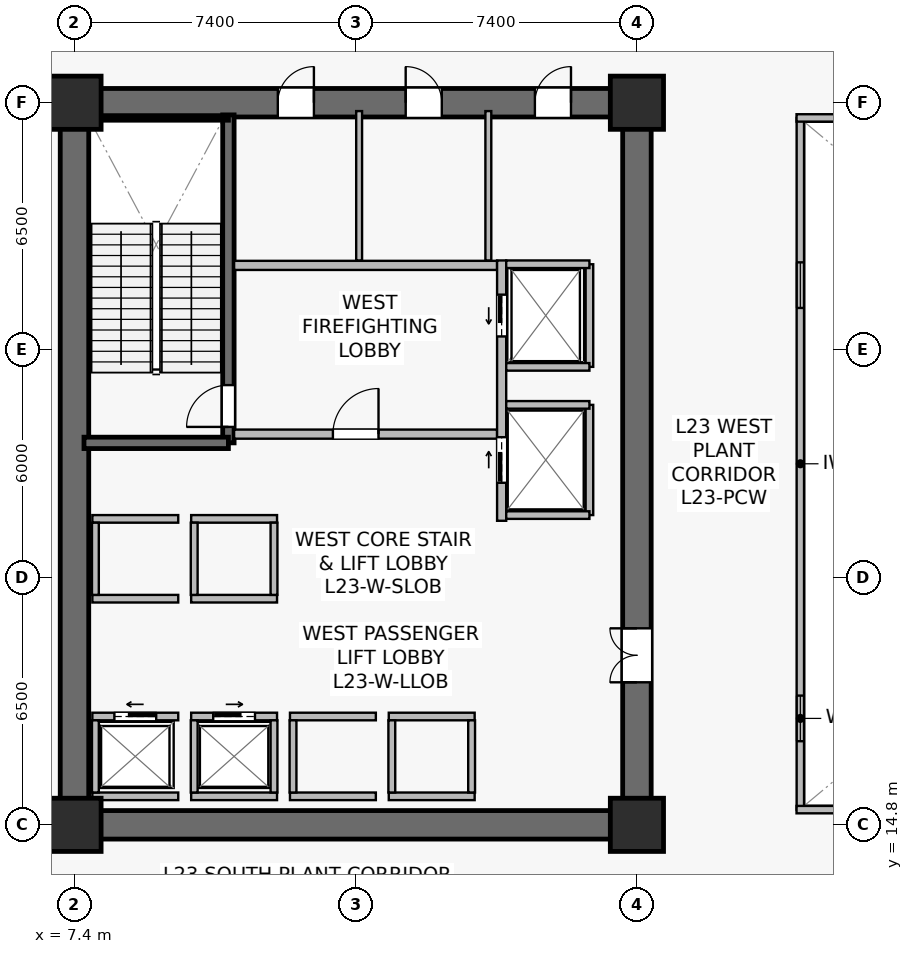
"""IFC4 building model, lengths in metres.
Left out: names, types, materials, properties, quantities, classifications, styles, units other than length and angle.
Written with IfcOpenShell. Run it as: python <this file> out.ifc"""

import sys

from ifc_helpers import new_model, si_unit, direction, frame, frame_2d, origin, origin_2d, place, context, subcontext, project, spatial, rectangle, extrude, source, transform, mapped, element, fill, save


model = new_model("IFC4")
c1 = context("Model", 3, precision=1e-05, world=origin(), true_north=direction((0.0, 1.0)))
c2 = subcontext(c1, "Body", "Model", "MODEL_VIEW")
j1 = project(units=[si_unit("LENGTHUNIT", "METRE"), si_unit("PLANEANGLEUNIT", "RADIAN")], contexts=[c1])
p1 = place(None, origin())
s1 = spatial("IfcSite", under=j1, at=p1, CompositionType="ELEMENT")
p2 = place(p1, origin())
s2 = spatial("IfcBuilding", under=s1, at=p2, CompositionType="ELEMENT")
p3 = place(p2, frame((0.0, 0.0, 94.9)))
s3 = spatial("IfcBuildingStorey", under=s2, at=p3, CompositionType="ELEMENT", Elevation=94.9)
p4 = place(p3, frame((7.025, 14.8, 0.0), z_axis=(0.0, 0.0, 1.0), x_axis=(1.0, 0.0, 0.0)))
e1 = element("IfcWall", 1, at=p4, inside=s3, PredefinedType="SHEAR", context=c2, shape_type="SweptSolid", body=[
    extrude(rectangle(XDim=15.55, YDim=0.75, at=frame_2d((7.775, 0.0))), origin(), (0.0, 0.0, 1.0), 5.09),
])
p5 = place(p3, frame((7.025, 33.8, 0.0), z_axis=(0.0, 0.0, 1.0), x_axis=(1.0, 0.0, 0.0)))
e2 = element("IfcWall", 2, at=p5, inside=s3, PredefinedType="SHEAR", context=c2, shape_type="SweptSolid", body=[
    extrude(rectangle(XDim=15.55, YDim=0.75, at=frame_2d((7.775, 0.0))), origin(), (0.0, 0.0, 1.0), 5.09),
])
p6 = place(p5, frame((5.725, 0.0, 0.0)))
e3 = element("IfcOpeningElement", 3, at=p6, cuts=e2, PredefinedType="OPENING", context=c2, shape_type="SweptSolid", body=[
    extrude(rectangle(XDim=0.95, YDim=2.15, at=frame_2d((0.475, 1.075))), frame((0.0, 0.385, 0.0), z_axis=(0.0, -1.0, 0.0), x_axis=(1.0, 0.0, 0.0)), (0.0, 0.0, 1.0), 0.77),
])
p7 = place(p5, frame((9.09, 0.0, 0.0)))
e4 = element("IfcOpeningElement", 4, at=p7, cuts=e2, PredefinedType="OPENING", context=c2, shape_type="SweptSolid", body=[
    extrude(rectangle(XDim=0.95, YDim=2.15, at=frame_2d((0.475, 1.075))), frame((0.0, 0.385, 0.0), z_axis=(0.0, -1.0, 0.0), x_axis=(1.0, 0.0, 0.0)), (0.0, 0.0, 1.0), 0.77),
])
p8 = place(p5, frame((12.49, 0.0, 0.0)))
e5 = element("IfcOpeningElement", 5, at=p8, cuts=e2, PredefinedType="OPENING", context=c2, shape_type="SweptSolid", body=[
    extrude(rectangle(XDim=0.95, YDim=2.15, at=frame_2d((0.475, 1.075))), frame((0.0, 0.385, 0.0), z_axis=(0.0, -1.0, 0.0), x_axis=(1.0, 0.0, 0.0)), (0.0, 0.0, 1.0), 0.77),
])
p9 = place(p3, frame((7.4, 15.175, 0.0), z_axis=(0.0, 0.0, 1.0), x_axis=(0.0, 1.0, 0.0)))
e6 = element("IfcWall", 6, at=p9, inside=s3, PredefinedType="SHEAR", context=c2, shape_type="SweptSolid", body=[
    extrude(rectangle(XDim=18.25, YDim=0.75, at=frame_2d((9.125, 0.0))), origin(), (0.0, 0.0, 1.0), 5.09),
])
p10 = place(p3, frame((22.2, 15.175, 0.0), z_axis=(0.0, 0.0, 1.0), x_axis=(0.0, 1.0, 0.0)))
e7 = element("IfcWall", 7, at=p10, inside=s3, PredefinedType="SHEAR", context=c2, shape_type="SweptSolid", body=[
    extrude(rectangle(XDim=18.25, YDim=0.75, at=frame_2d((9.125, 0.0))), origin(), (0.0, 0.0, 1.0), 5.09),
])
p11 = place(p10, frame((3.375, 0.0, 0.0)))
e8 = element("IfcOpeningElement", 8, at=p11, cuts=e7, PredefinedType="OPENING", context=c2, shape_type="SweptSolid", body=[
    extrude(rectangle(XDim=1.42, YDim=2.2, at=frame_2d((0.71, 1.1))), frame((0.0, 0.385, 0.0), z_axis=(0.0, -1.0, 0.0), x_axis=(1.0, 0.0, 0.0)), (0.0, 0.0, 1.0), 0.77),
])
p12 = place(p3, frame((11.45, 24.85, 0.0), z_axis=(0.0, 0.0, 1.0), x_axis=(0.0, 1.0, 0.0)))
e9 = element("IfcWall", 9, at=p12, inside=s3, PredefinedType="SHEAR", context=c2, shape_type="SweptSolid", body=[
    extrude(rectangle(XDim=8.63, YDim=0.3, at=frame_2d((4.315, 0.0))), origin(), (0.0, 0.0, 1.0), 5.09),
])
p13 = place(p12, frame((0.42, 0.0, 0.0)))
e10 = element("IfcOpeningElement", 10, at=p13, cuts=e9, PredefinedType="OPENING", context=c2, shape_type="SweptSolid", body=[
    extrude(rectangle(XDim=1.1, YDim=2.15, at=frame_2d((0.55, 1.075))), frame((0.0, 0.16, 0.0), z_axis=(0.0, -1.0, 0.0), x_axis=(1.0, 0.0, 0.0)), (0.0, 0.0, 1.0), 0.32),
])
p14 = place(p3, frame((7.65, 24.85, 0.0), z_axis=(0.0, 0.0, 1.0), x_axis=(1.0, 0.0, 0.0)))
e11 = element("IfcWall", 11, at=p14, inside=s3, PredefinedType="SHEAR", context=c2, shape_type="SweptSolid", body=[
    extrude(rectangle(XDim=3.8, YDim=0.3, at=frame_2d((1.9, 0.0))), origin(), (0.0, 0.0, 1.0), 5.09),
])
p15 = place(p3, frame((7.73, 33.4, 0.0), z_axis=(0.0, 0.0, 1.0), x_axis=(1.0, 0.0, 0.0)))
e12 = element("IfcWall", 12, at=p15, inside=s3, PredefinedType="SOLIDWALL", context=c2, shape_type="SweptSolid", body=[
    extrude(rectangle(XDim=3.72, YDim=0.12, at=frame_2d((1.86, 0.0))), origin(), (0.0, 0.0, 1.0), 5.09),
])
m1 = source(origin(), c2, "Body", "SweptSolid", [
    extrude(rectangle(XDim=1.4, YDim=1.4, at=origin_2d()), origin(), (0.0, 0.0, 1.0), 5.4),
])
for number, where, z_axis, x_axis in (
    (13, (7.4, 14.8, 0.0), (0.0, 0.0, 1.0), (1.0, 0.0, 0.0)),
    (14, (22.2, 14.8, 0.0), (0.0, 0.0, 1.0), (1.0, 0.0, 0.0)),
    (15, (7.4, 33.8, 0.0), (0.0, 0.0, 1.0), (1.0, 0.0, 0.0)),
    (16, (22.2, 33.8, 0.0), (0.0, 0.0, 1.0), (1.0, 0.0, 0.0)),
):
    element("IfcColumn", number, at=place(p3, frame(where, z_axis=z_axis, x_axis=x_axis)), inside=s3, PredefinedType="COLUMN", context=c2, shape_type="MappedRepresentation", body=[
        mapped(m1, transform((0.0, 0.0, 0.0), scale=1.0)),
    ])
p16 = place(p3, frame((11.6, 25.08, 0.0), z_axis=(0.0, 0.0, 1.0), x_axis=(1.0, 0.0, 0.0)))
e17 = element("IfcWall", 17, at=p16, inside=s3, PredefinedType="SOLIDWALL", context=c2, shape_type="SweptSolid", body=[
    extrude(rectangle(XDim=6.92, YDim=0.24, at=frame_2d((3.46, 0.0))), origin(), (0.0, 0.0, 1.0), 4.425),
])
p17 = place(p16, frame((2.6, 0.0, 0.0)))
e18 = element("IfcOpeningElement", 18, at=p17, cuts=e17, PredefinedType="OPENING", context=c2, shape_type="SweptSolid", body=[
    extrude(rectangle(XDim=1.2, YDim=2.16, at=frame_2d((0.6, 1.08))), frame((0.0, 0.13, 0.0), z_axis=(0.0, -1.0, 0.0), x_axis=(1.0, 0.0, 0.0)), (0.0, 0.0, 1.0), 0.26),
])
p18 = place(p3, frame((11.6, 29.52, 0.0), z_axis=(0.0, 0.0, 1.0), x_axis=(1.0, 0.0, 0.0)))
e19 = element("IfcWall", 19, at=p18, inside=s3, PredefinedType="SOLIDWALL", context=c2, shape_type="SweptSolid", body=[
    extrude(rectangle(XDim=6.92, YDim=0.24, at=frame_2d((3.46, 0.0))), origin(), (0.0, 0.0, 1.0), 4.425),
])
p19 = place(p3, frame((18.64, 22.8, 0.0), z_axis=(0.0, 0.0, 1.0), x_axis=(0.0, 1.0, 0.0)))
e20 = element("IfcWall", 20, at=p19, inside=s3, PredefinedType="SOLIDWALL", context=c2, shape_type="SweptSolid", body=[
    extrude(rectangle(XDim=6.85, YDim=0.24, at=frame_2d((3.425, 0.0))), origin(), (0.0, 0.0, 1.0), 4.175),
])
p20 = place(p19, frame((4.85, 0.0, 0.0)))
e21 = element("IfcOpeningElement", 21, at=p20, cuts=e20, PredefinedType="OPENING", context=c2, shape_type="SweptSolid", body=[
    extrude(rectangle(XDim=1.1, YDim=2.22, at=frame_2d((0.55, 1.11))), frame((0.0, 0.13, 0.0), z_axis=(0.0, -1.0, 0.0), x_axis=(1.0, 0.0, 0.0)), (0.0, 0.0, 1.0), 0.26),
])
p21 = place(p19, frame((1.0, 0.0, 0.0)))
e22 = element("IfcOpeningElement", 22, at=p21, cuts=e20, PredefinedType="OPENING", context=c2, shape_type="SweptSolid", body=[
    extrude(rectangle(XDim=1.2, YDim=2.22, at=frame_2d((0.6, 1.11))), frame((0.0, 0.13, 0.0), z_axis=(0.0, -1.0, 0.0), x_axis=(1.0, 0.0, 0.0)), (0.0, 0.0, 1.0), 0.26),
])
p22 = place(p3, frame((7.87, 17.65, 0.0), z_axis=(0.0, 0.0, 1.0), x_axis=(1.0, 0.0, 0.0)))
e23 = element("IfcWall", 23, at=p22, inside=s3, PredefinedType="SOLIDWALL", context=c2, shape_type="SweptSolid", body=[
    extrude(rectangle(XDim=2.26, YDim=0.2, at=frame_2d((1.13, 0.0))), origin(), (0.0, 0.0, 1.0), 5.09),
])
p23 = place(p22, frame((0.58, 0.0, 0.0)))
e24 = element("IfcOpeningElement", 24, at=p23, cuts=e23, PredefinedType="OPENING", context=c2, shape_type="SweptSolid", body=[
    extrude(rectangle(XDim=1.1, YDim=2.22, at=frame_2d((0.55, 1.11))), frame((0.0, 0.11, 0.0), z_axis=(0.0, -1.0, 0.0), x_axis=(1.0, 0.0, 0.0)), (0.0, 0.0, 1.0), 0.22),
])
p24 = place(p3, frame((7.87, 15.55, 0.0), z_axis=(0.0, 0.0, 1.0), x_axis=(1.0, 0.0, 0.0)))
e25 = element("IfcWall", 25, at=p24, inside=s3, PredefinedType="SOLIDWALL", context=c2, shape_type="SweptSolid", body=[
    extrude(rectangle(XDim=2.26, YDim=0.2, at=frame_2d((1.13, 0.0))), origin(), (0.0, 0.0, 1.0), 5.09),
])
p25 = place(p3, frame((7.95, 15.65, 0.0), z_axis=(0.0, 0.0, 1.0), x_axis=(0.0, 1.0, 0.0)))
e26 = element("IfcWall", 26, at=p25, inside=s3, PredefinedType="SOLIDWALL", context=c2, shape_type="SweptSolid", body=[
    extrude(rectangle(XDim=1.9, YDim=0.18, at=frame_2d((0.95, 0.0))), origin(), (0.0, 0.0, 1.0), 5.09),
])
p26 = place(p3, frame((10.47, 17.65, 0.0), z_axis=(0.0, 0.0, 1.0), x_axis=(1.0, 0.0, 0.0)))
e27 = element("IfcWall", 27, at=p26, inside=s3, PredefinedType="SOLIDWALL", context=c2, shape_type="SweptSolid", body=[
    extrude(rectangle(XDim=2.26, YDim=0.2, at=frame_2d((1.13, 0.0))), origin(), (0.0, 0.0, 1.0), 5.09),
])
p27 = place(p26, frame((0.58, 0.0, 0.0)))
e28 = element("IfcOpeningElement", 28, at=p27, cuts=e27, PredefinedType="OPENING", context=c2, shape_type="SweptSolid", body=[
    extrude(rectangle(XDim=1.1, YDim=2.22, at=frame_2d((0.55, 1.11))), frame((0.0, 0.11, 0.0), z_axis=(0.0, -1.0, 0.0), x_axis=(1.0, 0.0, 0.0)), (0.0, 0.0, 1.0), 0.22),
])
p28 = place(p3, frame((10.47, 15.55, 0.0), z_axis=(0.0, 0.0, 1.0), x_axis=(1.0, 0.0, 0.0)))
e29 = element("IfcWall", 29, at=p28, inside=s3, PredefinedType="SOLIDWALL", context=c2, shape_type="SweptSolid", body=[
    extrude(rectangle(XDim=2.26, YDim=0.2, at=frame_2d((1.13, 0.0))), origin(), (0.0, 0.0, 1.0), 5.09),
])
for number, where, z_axis, x_axis in (
    (30, (10.55, 15.65, 0.0), (0.0, 0.0, 1.0), (0.0, 1.0, 0.0)),
    (31, (12.65, 15.65, 0.0), (0.0, 0.0, 1.0), (0.0, 1.0, 0.0)),
):
    element("IfcWall", number, at=place(p3, frame(where, z_axis=z_axis, x_axis=x_axis)), inside=s3, PredefinedType="SOLIDWALL", context=c2, shape_type="SweptSolid", body=[
        extrude(rectangle(XDim=1.9, YDim=0.18, at=frame_2d((0.95, 0.0))), origin(), (0.0, 0.0, 1.0), 5.09),
    ])
for number, where, z_axis, x_axis in (
    (32, (13.07, 17.65, 0.0), (0.0, 0.0, 1.0), (1.0, 0.0, 0.0)),
    (33, (13.07, 15.55, 0.0), (0.0, 0.0, 1.0), (1.0, 0.0, 0.0)),
):
    element("IfcWall", number, at=place(p3, frame(where, z_axis=z_axis, x_axis=x_axis)), inside=s3, PredefinedType="SOLIDWALL", context=c2, shape_type="SweptSolid", body=[
        extrude(rectangle(XDim=2.26, YDim=0.2, at=frame_2d((1.13, 0.0))), origin(), (0.0, 0.0, 1.0), 4.425),
    ])
p29 = place(p3, frame((13.15, 15.65, 0.0), z_axis=(0.0, 0.0, 1.0), x_axis=(0.0, 1.0, 0.0)))
e34 = element("IfcWall", 34, at=p29, inside=s3, PredefinedType="SOLIDWALL", context=c2, shape_type="SweptSolid", body=[
    extrude(rectangle(XDim=1.9, YDim=0.18, at=frame_2d((0.95, 0.0))), origin(), (0.0, 0.0, 1.0), 5.09),
])
for number, where, z_axis, x_axis in (
    (35, (15.67, 17.65, 0.0), (0.0, 0.0, 1.0), (1.0, 0.0, 0.0)),
    (36, (15.67, 15.55, 0.0), (0.0, 0.0, 1.0), (1.0, 0.0, 0.0)),
):
    element("IfcWall", number, at=place(p3, frame(where, z_axis=z_axis, x_axis=x_axis)), inside=s3, PredefinedType="SOLIDWALL", context=c2, shape_type="SweptSolid", body=[
        extrude(rectangle(XDim=2.26, YDim=0.2, at=frame_2d((1.13, 0.0))), origin(), (0.0, 0.0, 1.0), 5.09),
    ])
for number, where, z_axis, x_axis in (
    (37, (15.75, 15.65, 0.0), (0.0, 0.0, 1.0), (0.0, 1.0, 0.0)),
    (38, (17.85, 15.65, 0.0), (0.0, 0.0, 1.0), (0.0, 1.0, 0.0)),
):
    element("IfcWall", number, at=place(p3, frame(where, z_axis=z_axis, x_axis=x_axis)), inside=s3, PredefinedType="SOLIDWALL", context=c2, shape_type="SweptSolid", body=[
        extrude(rectangle(XDim=1.9, YDim=0.18, at=frame_2d((0.95, 0.0))), origin(), (0.0, 0.0, 1.0), 5.09),
    ])
for number, where, z_axis, x_axis in (
    (39, (7.87, 20.75, 0.0), (0.0, 0.0, 1.0), (1.0, 0.0, 0.0)),
    (40, (7.87, 22.85, 0.0), (0.0, 0.0, 1.0), (1.0, 0.0, 0.0)),
):
    element("IfcWall", number, at=place(p3, frame(where, z_axis=z_axis, x_axis=x_axis)), inside=s3, PredefinedType="SOLIDWALL", context=c2, shape_type="SweptSolid", body=[
        extrude(rectangle(XDim=2.26, YDim=0.2, at=frame_2d((1.13, 0.0))), origin(), (0.0, 0.0, 1.0), 5.09),
    ])
p30 = place(p3, frame((7.95, 20.85, 0.0), z_axis=(0.0, 0.0, 1.0), x_axis=(0.0, 1.0, 0.0)))
e41 = element("IfcWall", 41, at=p30, inside=s3, PredefinedType="SOLIDWALL", context=c2, shape_type="SweptSolid", body=[
    extrude(rectangle(XDim=1.9, YDim=0.18, at=frame_2d((0.95, 0.0))), origin(), (0.0, 0.0, 1.0), 5.09),
])
for number, where, z_axis, x_axis in (
    (42, (10.47, 20.75, 0.0), (0.0, 0.0, 1.0), (1.0, 0.0, 0.0)),
    (43, (10.47, 22.85, 0.0), (0.0, 0.0, 1.0), (1.0, 0.0, 0.0)),
):
    element("IfcWall", number, at=place(p3, frame(where, z_axis=z_axis, x_axis=x_axis)), inside=s3, PredefinedType="SOLIDWALL", context=c2, shape_type="SweptSolid", body=[
        extrude(rectangle(XDim=2.26, YDim=0.2, at=frame_2d((1.13, 0.0))), origin(), (0.0, 0.0, 1.0), 5.09),
    ])
for number, where, z_axis, x_axis in (
    (44, (10.55, 20.85, 0.0), (0.0, 0.0, 1.0), (0.0, 1.0, 0.0)),
    (45, (12.65, 20.85, 0.0), (0.0, 0.0, 1.0), (0.0, 1.0, 0.0)),
):
    element("IfcWall", number, at=place(p3, frame(where, z_axis=z_axis, x_axis=x_axis)), inside=s3, PredefinedType="SOLIDWALL", context=c2, shape_type="SweptSolid", body=[
        extrude(rectangle(XDim=1.9, YDim=0.18, at=frame_2d((0.95, 0.0))), origin(), (0.0, 0.0, 1.0), 5.09),
    ])
p31 = place(p3, frame((20.95, 26.85, 0.0), z_axis=(0.0, 0.0, 1.0), x_axis=(0.0, 1.0, 0.0)))
e46 = element("IfcWall", 46, at=p31, inside=s3, PredefinedType="SOLIDWALL", context=c2, shape_type="SweptSolid", body=[
    extrude(rectangle(XDim=2.7, YDim=0.2, at=frame_2d((1.35, 0.0))), origin(), (0.0, 0.0, 1.0), 5.09),
])
p32 = place(p3, frame((18.76, 29.55, 0.0), z_axis=(0.0, 0.0, 1.0), x_axis=(1.0, 0.0, 0.0)))
e47 = element("IfcWall", 47, at=p32, inside=s3, PredefinedType="SOLIDWALL", context=c2, shape_type="SweptSolid", body=[
    extrude(rectangle(XDim=2.19, YDim=0.2, at=frame_2d((1.095, 0.0))), origin(), (0.0, 0.0, 1.0), 5.09),
])
p33 = place(p3, frame((18.76, 26.85, 0.0), z_axis=(0.0, 0.0, 1.0), x_axis=(1.0, 0.0, 0.0)))
e48 = element("IfcWall", 48, at=p33, inside=s3, PredefinedType="SOLIDWALL", context=c2, shape_type="SweptSolid", body=[
    extrude(rectangle(XDim=2.19, YDim=0.2, at=frame_2d((1.095, 0.0))), origin(), (0.0, 0.0, 1.0), 4.487),
])
p34 = place(p3, frame((20.95, 22.95, 0.0), z_axis=(0.0, 0.0, 1.0), x_axis=(0.0, 1.0, 0.0)))
e49 = element("IfcWall", 49, at=p34, inside=s3, PredefinedType="SOLIDWALL", context=c2, shape_type="SweptSolid", body=[
    extrude(rectangle(XDim=2.9, YDim=0.2, at=frame_2d((1.45, 0.0))), origin(), (0.0, 0.0, 1.0), 4.175),
])
for number, where, z_axis, x_axis in (
    (50, (18.76, 25.85, 0.0), (0.0, 0.0, 1.0), (1.0, 0.0, 0.0)),
    (51, (18.76, 22.95, 0.0), (0.0, 0.0, 1.0), (1.0, 0.0, 0.0)),
):
    element("IfcWall", number, at=place(p3, frame(where, z_axis=z_axis, x_axis=x_axis)), inside=s3, PredefinedType="SOLIDWALL", context=c2, shape_type="SweptSolid", body=[
        extrude(rectangle(XDim=2.19, YDim=0.2, at=frame_2d((1.095, 0.0))), origin(), (0.0, 0.0, 1.0), 5.09),
    ])
p35 = place(p3, frame((14.89, 29.65, 0.0), z_axis=(0.0, 0.0, 1.0), x_axis=(0.0, 1.0, 0.0)))
e52 = element("IfcWall", 52, at=p35, inside=s3, PredefinedType="PLUMBINGWALL", context=c2, shape_type="SweptSolid", body=[
    extrude(rectangle(XDim=3.93, YDim=0.155, at=frame_2d((1.965, 0.0))), origin(), (0.0, 0.0, 1.0), 4.425),
])
p36 = place(p3, frame((18.29, 29.65, 0.0), z_axis=(0.0, 0.0, 1.0), x_axis=(0.0, 1.0, 0.0)))
e53 = element("IfcWall", 53, at=p36, inside=s3, PredefinedType="PLUMBINGWALL", context=c2, shape_type="SweptSolid", body=[
    extrude(rectangle(XDim=3.93, YDim=0.155, at=frame_2d((1.965, 0.0))), origin(), (0.0, 0.0, 1.0), 5.09),
])
p37 = place(p3, frame((26.5, 15.2, 0.0), z_axis=(0.0, 0.0, 1.0), x_axis=(0.0, 1.0, 0.0)))
e54 = element("IfcWall", 54, at=p37, inside=s3, PredefinedType="SOLIDWALL", context=c2, shape_type="SweptSolid", body=[
    extrude(rectangle(XDim=18.2, YDim=0.195, at=frame_2d((9.1, 0.0))), origin(), (0.0, 0.0, 1.0), 5.09),
])
p38 = place(p37, frame((1.8, 0.0, 0.9)))
e55 = element("IfcOpeningElement", 55, at=p38, cuts=e54, PredefinedType="OPENING", context=c2, shape_type="SweptSolid", body=[
    extrude(rectangle(XDim=1.2, YDim=1.35, at=frame_2d((0.6, 0.675))), frame((0.0, 0.107, 0.0), z_axis=(0.0, -1.0, 0.0), x_axis=(1.0, 0.0, 0.0)), (0.0, 0.0, 1.0), 0.215),
])
p39 = place(p37, frame((13.2, 0.0, 0.9)))
e56 = element("IfcOpeningElement", 56, at=p39, cuts=e54, PredefinedType="OPENING", context=c2, shape_type="SweptSolid", body=[
    extrude(rectangle(XDim=1.2, YDim=1.35, at=frame_2d((0.6, 0.675))), frame((0.0, 0.107, 0.0), z_axis=(0.0, -1.0, 0.0), x_axis=(1.0, 0.0, 0.0)), (0.0, 0.0, 1.0), 0.215),
])
for number, where, z_axis, x_axis in (
    (57, (26.4, 15.2, 0.0), (0.0, 0.0, 1.0), (1.0, 0.0, 0.0)),
    (58, (26.4, 33.4, 0.0), (0.0, 0.0, 1.0), (1.0, 0.0, 0.0)),
):
    element("IfcWall", number, at=place(p3, frame(where, z_axis=z_axis, x_axis=x_axis)), inside=s3, PredefinedType="SOLIDWALL", context=c2, shape_type="SweptSolid", body=[
        extrude(rectangle(XDim=22.0, YDim=0.195, at=frame_2d((11.0, 0.0))), origin(), (0.0, 0.0, 1.0), 5.09),
    ])
m2 = source(origin(), c2, "Body", "SweptSolid", [
    extrude(rectangle(XDim=1.2, YDim=1.35, at=frame_2d((0.6, 0.675))), frame((0.0, 0.03, 0.0), z_axis=(0.0, -1.0, 0.0), x_axis=(1.0, 0.0, 0.0)), (0.0, 0.0, 1.0), 0.06),
])
p40 = place(p38, origin())
e59 = element("IfcWindow", 59, at=p40, inside=s3, PartitioningType="SINGLE_PANEL", PredefinedType="WINDOW", context=c2, shape_type="MappedRepresentation", body=[
    mapped(m2, transform((0.0, 0.0, 0.0), scale=1.0)),
])
fill(e55, e59)
p41 = place(p39, origin())
e60 = element("IfcWindow", 60, at=p41, inside=s3, PartitioningType="SINGLE_PANEL", PredefinedType="WINDOW", context=c2, shape_type="MappedRepresentation", body=[
    mapped(m2, transform((0.0, 0.0, 0.0), scale=1.0)),
])
fill(e56, e60)
m3 = source(origin(), c2, "Body", "SweptSolid", [
    extrude(rectangle(XDim=1.1, YDim=2.15, at=frame_2d((0.55, 1.075))), frame((0.0, 0.025, 0.0), z_axis=(0.0, -1.0, 0.0), x_axis=(1.0, 0.0, 0.0)), (0.0, 0.0, 1.0), 0.05),
])
p42 = place(p13, origin())
e61 = element("IfcDoor", 61, at=p42, inside=s3, OperationType="SINGLE_SWING_LEFT", PredefinedType="DOOR", context=c2, shape_type="MappedRepresentation", body=[
    mapped(m3, transform((0.0, 0.0, 0.0), scale=1.0)),
])
fill(e10, e61)
m4 = source(origin(), c2, "Body", "SweptSolid", [
    extrude(rectangle(XDim=1.2, YDim=2.16, at=frame_2d((0.6, 1.08))), frame((0.0, 0.025, 0.0), z_axis=(0.0, -1.0, 0.0), x_axis=(1.0, 0.0, 0.0)), (0.0, 0.0, 1.0), 0.05),
])
p43 = place(p17, origin())
e62 = element("IfcDoor", 62, at=p43, inside=s3, OperationType="SINGLE_SWING_RIGHT", PredefinedType="DOOR", context=c2, shape_type="MappedRepresentation", body=[
    mapped(m4, transform((0.0, 0.0, 0.0), scale=1.0)),
])
fill(e18, e62)
m5 = source(origin(), c2, "Body", "SweptSolid", [
    extrude(rectangle(XDim=1.1, YDim=2.22, at=frame_2d((0.55, 1.11))), frame((0.0, 0.025, 0.0), z_axis=(0.0, -1.0, 0.0), x_axis=(1.0, 0.0, 0.0)), (0.0, 0.0, 1.0), 0.05),
])
p44 = place(p23, origin())
e63 = element("IfcDoor", 63, at=p44, inside=s3, OperationType="SLIDING_TO_LEFT", PredefinedType="USERDEFINED", context=c2, shape_type="MappedRepresentation", body=[
    mapped(m5, transform((0.0, 0.0, 0.0), scale=1.0)),
])
fill(e24, e63)
p45 = place(p27, origin())
e64 = element("IfcDoor", 64, at=p45, inside=s3, OperationType="SLIDING_TO_RIGHT", PredefinedType="USERDEFINED", context=c2, shape_type="MappedRepresentation", body=[
    mapped(m5, transform((0.0, 0.0, 0.0), scale=1.0)),
])
fill(e28, e64)
p46 = place(p20, origin())
e65 = element("IfcDoor", 65, at=p46, inside=s3, OperationType="SLIDING_TO_LEFT", PredefinedType="USERDEFINED", context=c2, shape_type="MappedRepresentation", body=[
    mapped(m5, transform((0.0, 0.0, 0.0), scale=1.0)),
])
fill(e21, e65)
m6 = source(origin(), c2, "Body", "SweptSolid", [
    extrude(rectangle(XDim=1.2, YDim=2.22, at=frame_2d((0.6, 1.11))), frame((0.0, 0.025, 0.0), z_axis=(0.0, -1.0, 0.0), x_axis=(1.0, 0.0, 0.0)), (0.0, 0.0, 1.0), 0.05),
])
p47 = place(p21, origin())
e66 = element("IfcDoor", 66, at=p47, inside=s3, OperationType="SLIDING_TO_RIGHT", PredefinedType="USERDEFINED", context=c2, shape_type="MappedRepresentation", body=[
    mapped(m6, transform((0.0, 0.0, 0.0), scale=1.0)),
])
fill(e22, e66)
m7 = source(origin(), c2, "Body", "SweptSolid", [
    extrude(rectangle(XDim=1.42, YDim=2.2, at=frame_2d((0.71, 1.1))), frame((0.0, 0.025, 0.0), z_axis=(0.0, -1.0, 0.0), x_axis=(1.0, 0.0, 0.0)), (0.0, 0.0, 1.0), 0.05),
])
p48 = place(p11, origin())
e67 = element("IfcDoor", 67, at=p48, inside=s3, OperationType="DOUBLE_DOOR_SINGLE_SWING", PredefinedType="DOOR", context=c2, shape_type="MappedRepresentation", body=[
    mapped(m7, transform((0.0, 0.0, 0.0), scale=1.0)),
])
fill(e8, e67)
m8 = source(origin(), c2, "Body", "SweptSolid", [
    extrude(rectangle(XDim=0.95, YDim=2.15, at=frame_2d((0.475, 1.075))), frame((0.0, 0.025, 0.0), z_axis=(0.0, -1.0, 0.0), x_axis=(1.0, 0.0, 0.0)), (0.0, 0.0, 1.0), 0.05),
])
p49 = place(p6, origin())
e68 = element("IfcDoor", 68, at=p49, inside=s3, OperationType="SINGLE_SWING_RIGHT", PredefinedType="DOOR", context=c2, shape_type="MappedRepresentation", body=[
    mapped(m8, transform((0.0, 0.0, 0.0), scale=1.0)),
])
fill(e3, e68)
p50 = place(p7, origin())
e69 = element("IfcDoor", 69, at=p50, inside=s3, OperationType="SINGLE_SWING_LEFT", PredefinedType="DOOR", context=c2, shape_type="MappedRepresentation", body=[
    mapped(m8, transform((0.0, 0.0, 0.0), scale=1.0)),
])
fill(e4, e69)
p51 = place(p8, origin())
e70 = element("IfcDoor", 70, at=p51, inside=s3, OperationType="SINGLE_SWING_RIGHT", PredefinedType="DOOR", context=c2, shape_type="MappedRepresentation", body=[
    mapped(m8, transform((0.0, 0.0, 0.0), scale=1.0)),
])
fill(e5, e70)
save(model, sys.argv[1])
